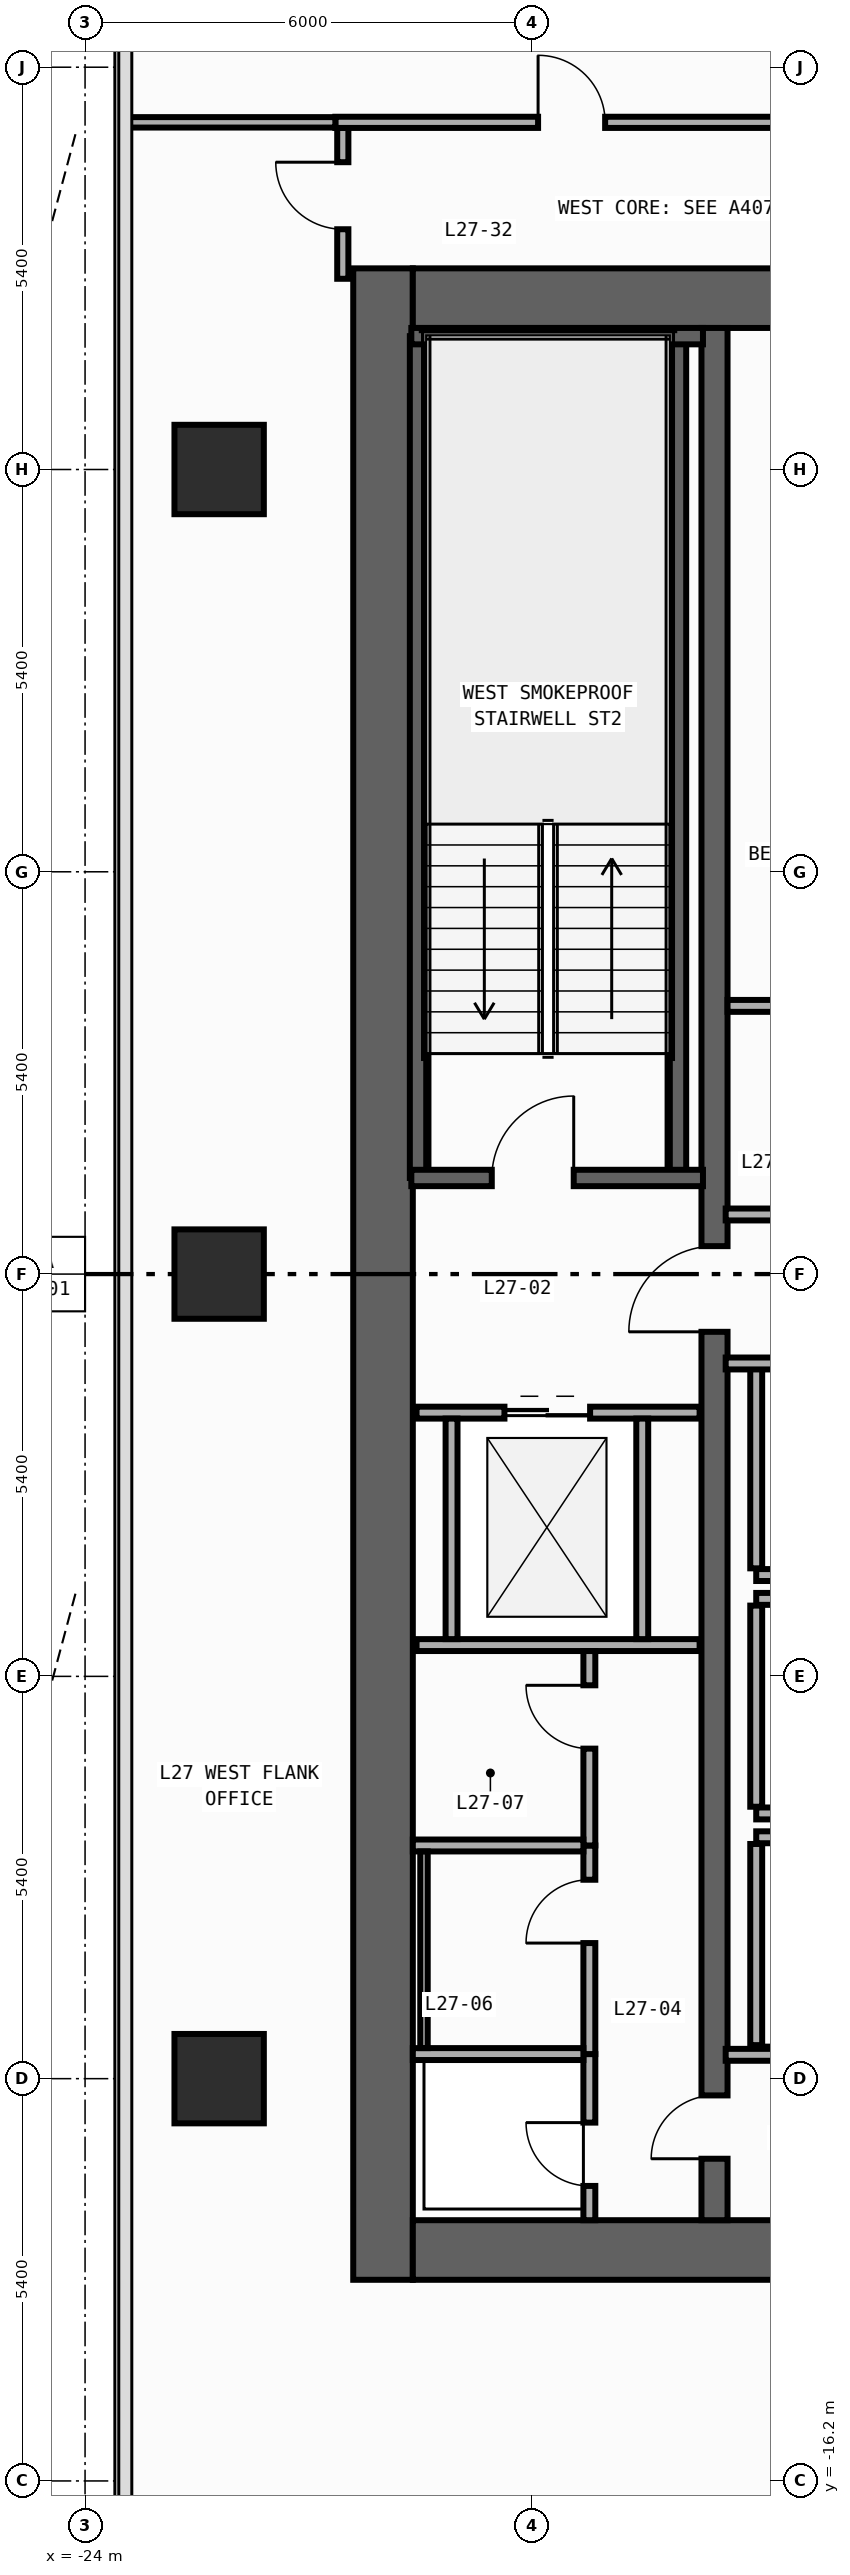
"""IFC4 building model, lengths in metres.
Left out: names, types, materials, properties, quantities, classifications, styles, units other than length and angle.
Written with IfcOpenShell. Run it as: python <this file> out.ifc"""

import sys

from ifc_helpers import new_model, si_unit, direction, frame, frame_2d, origin, origin_2d, place, context, subcontext, project, spatial, rectangle, extrude, element, fill, save


model = new_model("IFC4")
c1 = context("Model", 3, precision=1e-05, world=origin(), true_north=direction((0.0, 1.0)))
c2 = subcontext(c1, "Body", "Model", "MODEL_VIEW")
j1 = project(units=[si_unit("LENGTHUNIT", "METRE"), si_unit("PLANEANGLEUNIT", "RADIAN")], contexts=[c1])
p1 = place(None, origin())
s1 = spatial("IfcSite", under=j1, at=p1, CompositionType="ELEMENT")
p2 = place(p1, origin())
s2 = spatial("IfcBuilding", under=s1, at=p2, CompositionType="ELEMENT")
p3 = place(p2, frame((0.0, 0.0, 118.4)))
s3 = spatial("IfcBuildingStorey", under=s2, at=p3, CompositionType="ELEMENT", Elevation=118.4)
p4 = place(p3, frame((-20.0, -13.5, 0.0), z_axis=(0.0, 0.0, 1.0), x_axis=(0.0, 1.0, 0.0)))
e1 = element("IfcWall", 1, at=p4, inside=s3, PredefinedType="SHEAR", context=c2, shape_type="SweptSolid", body=[
    extrude(rectangle(XDim=27.0, YDim=0.8, at=frame_2d((13.5, 0.0))), origin(), (0.0, 0.0, 1.0), 3.94),
])
for number, where, z_axis, x_axis in (
    (2, (-19.6, -13.1, 0.0), (0.0, 0.0, 1.0), (1.0, 0.0, 0.0)),
    (3, (-19.6, 13.1, 0.0), (0.0, 0.0, 1.0), (1.0, 0.0, 0.0)),
):
    element("IfcWall", number, at=place(p3, frame(where, z_axis=z_axis, x_axis=x_axis)), inside=s3, PredefinedType="SHEAR", context=c2, shape_type="SweptSolid", body=[
        extrude(rectangle(XDim=6.8, YDim=0.8, at=frame_2d((3.4, 0.0))), origin(), (0.0, 0.0, 1.0), 3.94),
    ])
p5 = place(p3, frame((-15.55, -12.7, 0.0), z_axis=(0.0, 0.0, 1.0), x_axis=(0.0, 1.0, 0.0)))
e4 = element("IfcWall", 4, at=p5, inside=s3, PredefinedType="SHEAR", context=c2, shape_type="SweptSolid", body=[
    extrude(rectangle(XDim=25.4, YDim=0.35, at=frame_2d((12.7, 0.0))), origin(), (0.0, 0.0, 1.0), 3.94),
])
p6 = place(p5, frame((11.925, 0.0, 0.0)))
e5 = element("IfcOpeningElement", 5, at=p6, cuts=e4, PredefinedType="OPENING", context=c2, shape_type="SweptSolid", body=[
    extrude(rectangle(XDim=1.15, YDim=2.2, at=frame_2d((0.575, 1.1))), frame((0.0, 0.185, 0.0), z_axis=(0.0, -1.0, 0.0), x_axis=(1.0, 0.0, 0.0)), (0.0, 0.0, 1.0), 0.37),
])
p7 = place(p5, frame((0.825, 0.0, 0.0)))
e6 = element("IfcOpeningElement", 6, at=p7, cuts=e4, PredefinedType="OPENING", context=c2, shape_type="SweptSolid", body=[
    extrude(rectangle(XDim=0.85, YDim=2.1, at=frame_2d((0.425, 1.05))), frame((0.0, 0.185, 0.0), z_axis=(0.0, -1.0, 0.0), x_axis=(1.0, 0.0, 0.0)), (0.0, 0.0, 1.0), 0.37),
])
for number, where, z_axis, x_axis in (
    (7, (-16.04, 1.29, 0.0), (0.0, 0.0, 1.0), (0.0, 1.0, 0.0)),
    (8, (-19.53, 1.29, 0.0), (0.0, 0.0, 1.0), (0.0, 1.0, 0.0)),
):
    element("IfcWall", number, at=place(p3, frame(where, z_axis=z_axis, x_axis=x_axis)), inside=s3, PredefinedType="SHEAR", context=c2, shape_type="SweptSolid", body=[
        extrude(rectangle(XDim=11.3, YDim=0.22, at=frame_2d((5.65, 0.0))), origin(), (0.0, 0.0, 1.0), 3.94),
    ])
p8 = place(p3, frame((-19.62, 12.59, 0.0), z_axis=(0.0, 0.0, 1.0), x_axis=(1.0, 0.0, 0.0)))
e9 = element("IfcWall", 9, at=p8, inside=s3, PredefinedType="SHEAR", context=c2, shape_type="SweptSolid", body=[
    extrude(rectangle(XDim=3.915, YDim=0.22, at=frame_2d((1.958, 0.0))), origin(), (0.0, 0.0, 1.0), 3.94),
])
p9 = place(p3, frame((-19.62, 1.29, 0.0), z_axis=(0.0, 0.0, 1.0), x_axis=(1.0, 0.0, 0.0)))
e10 = element("IfcWall", 10, at=p9, inside=s3, PredefinedType="SHEAR", context=c2, shape_type="SweptSolid", body=[
    extrude(rectangle(XDim=3.915, YDim=0.22, at=frame_2d((1.958, 0.0))), origin(), (0.0, 0.0, 1.0), 3.94),
])
p10 = place(p9, frame((1.08, 0.0, 0.0)))
e11 = element("IfcOpeningElement", 11, at=p10, cuts=e10, PredefinedType="OPENING", context=c2, shape_type="SweptSolid", body=[
    extrude(rectangle(XDim=1.1, YDim=2.2, at=frame_2d((0.55, 1.1))), frame((0.0, 0.12, 0.0), z_axis=(0.0, -1.0, 0.0), x_axis=(1.0, 0.0, 0.0)), (0.0, 0.0, 1.0), 0.24),
])
for number, where, z_axis, x_axis in (
    (12, (-22.2, -10.8, 0.0), (0.0, 0.0, 1.0), (1.0, 0.0, 0.0)),
    (13, (-22.2, 0.0, 0.0), (0.0, 0.0, 1.0), (1.0, 0.0, 0.0)),
    (14, (-22.2, 10.8, 0.0), (0.0, 0.0, 1.0), (1.0, 0.0, 0.0)),
):
    element("IfcColumn", number, at=place(p3, frame(where, z_axis=z_axis, x_axis=x_axis)), inside=s3, PredefinedType="COLUMN", context=c2, shape_type="SweptSolid", body=[
        extrude(rectangle(XDim=1.2, YDim=1.2, at=origin_2d()), origin(), (0.0, 0.0, 1.0), 4.2),
    ])
p11 = place(p3, frame((-14.99, -4.04, 0.0), z_axis=(0.0, 0.0, 1.0), x_axis=(1.0, 0.0, 0.0)))
e15 = element("IfcWall", 15, at=p11, inside=s3, PredefinedType="STANDARD", context=c2, shape_type="SweptSolid", body=[
    extrude(rectangle(XDim=2.19, YDim=0.16, at=frame_2d((1.095, 0.0))), origin(), (0.0, 0.0, 1.0), 3.94),
])
p12 = place(p3, frame((-14.99, -3.95, 0.0), z_axis=(0.0, 0.0, 1.0), x_axis=(0.0, 1.0, 0.0)))
e16 = element("IfcWall", 16, at=p12, inside=s3, PredefinedType="STANDARD", context=c2, shape_type="SweptSolid", body=[
    extrude(rectangle(XDim=2.7, YDim=0.16, at=frame_2d((1.35, 0.0))), origin(), (0.0, 0.0, 1.0), 3.94),
])
for number, where, z_axis, x_axis in (
    (17, (-14.99, -7.24, 0.0), (0.0, 0.0, 1.0), (1.0, 0.0, 0.0)),
    (18, (-14.99, -4.36, 0.0), (0.0, 0.0, 1.0), (1.0, 0.0, 0.0)),
):
    element("IfcWall", number, at=place(p3, frame(where, z_axis=z_axis, x_axis=x_axis)), inside=s3, PredefinedType="STANDARD", context=c2, shape_type="SweptSolid", body=[
        extrude(rectangle(XDim=2.19, YDim=0.16, at=frame_2d((1.095, 0.0))), origin(), (0.0, 0.0, 1.0), 3.94),
    ])
p13 = place(p3, frame((-14.99, -7.15, 0.0), z_axis=(0.0, 0.0, 1.0), x_axis=(0.0, 1.0, 0.0)))
e19 = element("IfcWall", 19, at=p13, inside=s3, PredefinedType="STANDARD", context=c2, shape_type="SweptSolid", body=[
    extrude(rectangle(XDim=2.7, YDim=0.16, at=frame_2d((1.35, 0.0))), origin(), (0.0, 0.0, 1.0), 3.94),
])
p14 = place(p3, frame((-14.99, -7.56, 0.0), z_axis=(0.0, 0.0, 1.0), x_axis=(1.0, 0.0, 0.0)))
e20 = element("IfcWall", 20, at=p14, inside=s3, PredefinedType="STANDARD", context=c2, shape_type="SweptSolid", body=[
    extrude(rectangle(XDim=2.19, YDim=0.16, at=frame_2d((1.095, 0.0))), origin(), (0.0, 0.0, 1.0), 3.94),
])
p15 = place(p3, frame((-14.99, -10.35, 0.0), z_axis=(0.0, 0.0, 1.0), x_axis=(0.0, 1.0, 0.0)))
e21 = element("IfcWall", 21, at=p15, inside=s3, PredefinedType="STANDARD", context=c2, shape_type="SweptSolid", body=[
    extrude(rectangle(XDim=2.7, YDim=0.16, at=frame_2d((1.35, 0.0))), origin(), (0.0, 0.0, 1.0), 3.94),
])
p16 = place(p3, frame((-19.55, -1.86, 0.0), z_axis=(0.0, 0.0, 1.0), x_axis=(1.0, 0.0, 0.0)))
e22 = element("IfcWall", 22, at=p16, inside=s3, PredefinedType="STANDARD", context=c2, shape_type="SweptSolid", body=[
    extrude(rectangle(XDim=3.8, YDim=0.16, at=frame_2d((1.9, 0.0))), origin(), (0.0, 0.0, 1.0), 3.94),
])
p17 = place(p16, frame((1.18, 0.0, 0.0)))
e23 = element("IfcOpeningElement", 23, at=p17, cuts=e22, PredefinedType="OPENING", context=c2, shape_type="SweptSolid", body=[
    extrude(rectangle(XDim=1.15, YDim=2.2, at=frame_2d((0.575, 1.1))), frame((0.0, 0.09, 0.0), z_axis=(0.0, -1.0, 0.0), x_axis=(1.0, 0.0, 0.0)), (0.0, 0.0, 1.0), 0.18),
])
p18 = place(p3, frame((-19.55, -4.98, 0.0), z_axis=(0.0, 0.0, 1.0), x_axis=(1.0, 0.0, 0.0)))
e24 = element("IfcWall", 24, at=p18, inside=s3, PredefinedType="STANDARD", context=c2, shape_type="SweptSolid", body=[
    extrude(rectangle(XDim=3.8, YDim=0.16, at=frame_2d((1.9, 0.0))), origin(), (0.0, 0.0, 1.0), 3.94),
])
for number, where, z_axis, x_axis in (
    (25, (-19.08, -4.9, 0.0), (0.0, 0.0, 1.0), (0.0, 1.0, 0.0)),
    (26, (-16.52, -4.9, 0.0), (0.0, 0.0, 1.0), (0.0, 1.0, 0.0)),
):
    element("IfcWall", number, at=place(p3, frame(where, z_axis=z_axis, x_axis=x_axis)), inside=s3, PredefinedType="STANDARD", context=c2, shape_type="SweptSolid", body=[
        extrude(rectangle(XDim=2.96, YDim=0.16, at=frame_2d((1.48, 0.0))), origin(), (0.0, 0.0, 1.0), 3.94),
    ])
for number, where, z_axis, x_axis in (
    (27, (-15.4, 0.8, 0.0), (0.0, 0.0, 1.0), (1.0, 0.0, 0.0)),
    (28, (-15.4, -1.2, 0.0), (0.0, 0.0, 1.0), (1.0, 0.0, 0.0)),
    (29, (-15.4, -10.48, 0.0), (0.0, 0.0, 1.0), (1.0, 0.0, 0.0)),
):
    element("IfcWall", number, at=place(p3, frame(where, z_axis=z_axis, x_axis=x_axis)), inside=s3, PredefinedType="STANDARD", context=c2, shape_type="SweptSolid", body=[
        extrude(rectangle(XDim=2.6, YDim=0.16, at=frame_2d((1.3, 0.0))), origin(), (0.0, 0.0, 1.0), 3.94),
    ])
p19 = place(p3, frame((-17.23, -12.7, 0.0), z_axis=(0.0, 0.0, 1.0), x_axis=(0.0, 1.0, 0.0)))
e30 = element("IfcWall", 30, at=p19, inside=s3, PredefinedType="PARTITIONING", context=c2, shape_type="SweptSolid", body=[
    extrude(rectangle(XDim=2.23, YDim=0.16, at=frame_2d((1.115, 0.0))), origin(), (0.0, 0.0, 1.0), 3.94),
])
p20 = place(p19, frame((0.46, 0.0, 0.0)))
e31 = element("IfcOpeningElement", 31, at=p20, cuts=e30, PredefinedType="OPENING", context=c2, shape_type="SweptSolid", body=[
    extrude(rectangle(XDim=0.85, YDim=2.1, at=frame_2d((0.425, 1.05))), frame((0.0, 0.09, 0.0), z_axis=(0.0, -1.0, 0.0), x_axis=(1.0, 0.0, 0.0)), (0.0, 0.0, 1.0), 0.18),
])
p21 = place(p3, frame((-17.23, -10.47, 0.0), z_axis=(0.0, 0.0, 1.0), x_axis=(0.0, 1.0, 0.0)))
e32 = element("IfcWall", 32, at=p21, inside=s3, PredefinedType="PARTITIONING", context=c2, shape_type="SweptSolid", body=[
    extrude(rectangle(XDim=2.8, YDim=0.16, at=frame_2d((1.4, 0.0))), origin(), (0.0, 0.0, 1.0), 3.94),
])
p22 = place(p21, frame((1.49, 0.0, 0.0)))
e33 = element("IfcOpeningElement", 33, at=p22, cuts=e32, PredefinedType="OPENING", context=c2, shape_type="SweptSolid", body=[
    extrude(rectangle(XDim=0.85, YDim=2.1, at=frame_2d((0.425, 1.05))), frame((0.0, 0.09, 0.0), z_axis=(0.0, -1.0, 0.0), x_axis=(1.0, 0.0, 0.0)), (0.0, 0.0, 1.0), 0.18),
])
p23 = place(p3, frame((-17.23, -7.67, 0.0), z_axis=(0.0, 0.0, 1.0), x_axis=(0.0, 1.0, 0.0)))
e34 = element("IfcWall", 34, at=p23, inside=s3, PredefinedType="PARTITIONING", context=c2, shape_type="SweptSolid", body=[
    extrude(rectangle(XDim=2.61, YDim=0.16, at=frame_2d((1.305, 0.0))), origin(), (0.0, 0.0, 1.0), 3.94),
])
p24 = place(p23, frame((1.3, 0.0, 0.0)))
e35 = element("IfcOpeningElement", 35, at=p24, cuts=e34, PredefinedType="OPENING", context=c2, shape_type="SweptSolid", body=[
    extrude(rectangle(XDim=0.85, YDim=2.1, at=frame_2d((0.425, 1.05))), frame((0.0, 0.09, 0.0), z_axis=(0.0, -1.0, 0.0), x_axis=(1.0, 0.0, 0.0)), (0.0, 0.0, 1.0), 0.18),
])
for number, where, z_axis, x_axis in (
    (36, (-19.6, -10.47, 0.0), (0.0, 0.0, 1.0), (1.0, 0.0, 0.0)),
    (37, (-19.6, -7.67, 0.0), (0.0, 0.0, 1.0), (1.0, 0.0, 0.0)),
):
    element("IfcWall", number, at=place(p3, frame(where, z_axis=z_axis, x_axis=x_axis)), inside=s3, PredefinedType="PARTITIONING", context=c2, shape_type="SweptSolid", body=[
        extrude(rectangle(XDim=2.29, YDim=0.16, at=frame_2d((1.145, 0.0))), origin(), (0.0, 0.0, 1.0), 3.94),
    ])
p25 = place(p3, frame((-15.375, 3.6, 0.0), z_axis=(0.0, 0.0, 1.0), x_axis=(1.0, 0.0, 0.0)))
e38 = element("IfcWall", 38, at=p25, inside=s3, PredefinedType="PARTITIONING", context=c2, shape_type="SweptSolid", body=[
    extrude(rectangle(XDim=3.065, YDim=0.16, at=frame_2d((1.532, 0.0))), origin(), (0.0, 0.0, 1.0), 3.94),
])
p26 = place(p3, frame((-20.54, 13.36, 0.0), z_axis=(0.0, 0.0, 1.0), x_axis=(0.0, 1.0, 0.0)))
e39 = element("IfcWall", 39, at=p26, inside=s3, PredefinedType="PARTITIONING", context=c2, shape_type="SweptSolid", body=[
    extrude(rectangle(XDim=2.025, YDim=0.15, at=frame_2d((1.012, 0.0))), origin(), (0.0, 0.0, 1.0), 3.94),
])
p27 = place(p26, frame((0.665, 0.0, 0.0)))
e40 = element("IfcOpeningElement", 40, at=p27, cuts=e39, PredefinedType="OPENING", context=c2, shape_type="SweptSolid", body=[
    extrude(rectangle(XDim=0.9, YDim=2.15, at=frame_2d((0.45, 1.075))), frame((0.0, 0.085, 0.0), z_axis=(0.0, -1.0, 0.0), x_axis=(1.0, 0.0, 0.0)), (0.0, 0.0, 1.0), 0.17),
])
p28 = place(p3, frame((-20.64, 15.46, 0.0), z_axis=(0.0, 0.0, 1.0), x_axis=(1.0, 0.0, 0.0)))
e41 = element("IfcWall", 41, at=p28, inside=s3, PredefinedType="PARTITIONING", context=c2, shape_type="SweptSolid", body=[
    extrude(rectangle(XDim=8.194, YDim=0.15, at=frame_2d((4.097, 0.0))), origin(), (0.0, 0.0, 1.0), 3.94),
])
p29 = place(p28, frame((2.722, 0.0, 0.0)))
e42 = element("IfcOpeningElement", 42, at=p29, cuts=e41, PredefinedType="OPENING", context=c2, shape_type="SweptSolid", body=[
    extrude(rectangle(XDim=0.9, YDim=2.15, at=frame_2d((0.45, 1.075))), frame((0.0, 0.085, 0.0), z_axis=(0.0, -1.0, 0.0), x_axis=(1.0, 0.0, 0.0)), (0.0, 0.0, 1.0), 0.17),
])
p30 = place(p3, frame((-23.455, 15.46, 0.0), z_axis=(0.0, 0.0, 1.0), x_axis=(1.0, 0.0, 0.0)))
e43 = element("IfcWall", 43, at=p30, inside=s3, PredefinedType="PARTITIONING", context=c2, shape_type="SweptSolid", body=[
    extrude(rectangle(XDim=2.815, YDim=0.14, at=frame_2d((1.408, 0.0))), origin(), (0.0, 0.0, 1.0), 3.94),
])
p31 = place(p3, frame((-19.45, -10.39, 0.0), z_axis=(0.0, 0.0, 1.0), x_axis=(0.0, 1.0, 0.0)))
e44 = element("IfcWall", 44, at=p31, inside=s3, PredefinedType="PARTITIONING", context=c2, shape_type="SweptSolid", body=[
    extrude(rectangle(XDim=2.64, YDim=0.1, at=frame_2d((1.32, 0.0))), origin(), (0.0, 0.0, 1.0), 3.94),
])
p32 = place(p10, origin())
e45 = element("IfcDoor", 45, at=p32, inside=s3, OperationType="SINGLE_SWING_RIGHT", PredefinedType="DOOR", context=c2, shape_type="SweptSolid", body=[
    extrude(rectangle(XDim=1.1, YDim=2.2, at=frame_2d((0.55, 1.1))), frame((0.0, 0.025, 0.0), z_axis=(0.0, -1.0, 0.0), x_axis=(1.0, 0.0, 0.0)), (0.0, 0.0, 1.0), 0.05),
])
fill(e11, e45)
p33 = place(p6, origin())
e46 = element("IfcDoor", 46, at=p33, inside=s3, OperationType="SINGLE_SWING_LEFT", PredefinedType="DOOR", context=c2, shape_type="SweptSolid", body=[
    extrude(rectangle(XDim=1.15, YDim=2.2, at=frame_2d((0.575, 1.1))), frame((0.0, 0.025, 0.0), z_axis=(0.0, -1.0, 0.0), x_axis=(1.0, 0.0, 0.0)), (0.0, 0.0, 1.0), 0.05),
])
fill(e5, e46)
p34 = place(p7, origin())
e47 = element("IfcDoor", 47, at=p34, inside=s3, OperationType="SINGLE_SWING_LEFT", PredefinedType="DOOR", context=c2, shape_type="SweptSolid", body=[
    extrude(rectangle(XDim=0.85, YDim=2.1, at=frame_2d((0.425, 1.05))), frame((0.0, 0.025, 0.0), z_axis=(0.0, -1.0, 0.0), x_axis=(1.0, 0.0, 0.0)), (0.0, 0.0, 1.0), 0.05),
])
fill(e6, e47)
p35 = place(p17, origin())
e48 = element("IfcDoor", 48, at=p35, inside=s3, OperationType="DOUBLE_DOOR_SLIDING", PredefinedType="DOOR", context=c2, shape_type="SweptSolid", body=[
    extrude(rectangle(XDim=1.15, YDim=2.2, at=frame_2d((0.575, 1.1))), frame((0.0, 0.025, 0.0), z_axis=(0.0, -1.0, 0.0), x_axis=(1.0, 0.0, 0.0)), (0.0, 0.0, 1.0), 0.05),
])
fill(e23, e48)
p36 = place(p20, origin())
e49 = element("IfcDoor", 49, at=p36, inside=s3, OperationType="SINGLE_SWING_RIGHT", PredefinedType="DOOR", context=c2, shape_type="SweptSolid", body=[
    extrude(rectangle(XDim=0.85, YDim=2.1, at=frame_2d((0.425, 1.05))), frame((0.0, 0.025, 0.0), z_axis=(0.0, -1.0, 0.0), x_axis=(1.0, 0.0, 0.0)), (0.0, 0.0, 1.0), 0.05),
])
fill(e31, e49)
p37 = place(p22, origin())
e50 = element("IfcDoor", 50, at=p37, inside=s3, OperationType="SINGLE_SWING_LEFT", PredefinedType="DOOR", context=c2, shape_type="SweptSolid", body=[
    extrude(rectangle(XDim=0.85, YDim=2.1, at=frame_2d((0.425, 1.05))), frame((0.0, 0.025, 0.0), z_axis=(0.0, -1.0, 0.0), x_axis=(1.0, 0.0, 0.0)), (0.0, 0.0, 1.0), 0.05),
])
fill(e33, e50)
p38 = place(p24, origin())
e51 = element("IfcDoor", 51, at=p38, inside=s3, OperationType="SINGLE_SWING_RIGHT", PredefinedType="DOOR", context=c2, shape_type="SweptSolid", body=[
    extrude(rectangle(XDim=0.85, YDim=2.1, at=frame_2d((0.425, 1.05))), frame((0.0, 0.025, 0.0), z_axis=(0.0, -1.0, 0.0), x_axis=(1.0, 0.0, 0.0)), (0.0, 0.0, 1.0), 0.05),
])
fill(e35, e51)
p39 = place(p27, origin())
e52 = element("IfcDoor", 52, at=p39, inside=s3, OperationType="SINGLE_SWING_RIGHT", PredefinedType="DOOR", context=c2, shape_type="SweptSolid", body=[
    extrude(rectangle(XDim=0.9, YDim=2.15, at=frame_2d((0.45, 1.075))), frame((0.0, 0.025, 0.0), z_axis=(0.0, -1.0, 0.0), x_axis=(1.0, 0.0, 0.0)), (0.0, 0.0, 1.0), 0.05),
])
fill(e40, e52)
p40 = place(p29, origin())
e53 = element("IfcDoor", 53, at=p40, inside=s3, OperationType="SINGLE_SWING_LEFT", PredefinedType="DOOR", context=c2, shape_type="SweptSolid", body=[
    extrude(rectangle(XDim=0.9, YDim=2.15, at=frame_2d((0.45, 1.075))), frame((0.0, 0.025, 0.0), z_axis=(0.0, -1.0, 0.0), x_axis=(1.0, 0.0, 0.0)), (0.0, 0.0, 1.0), 0.05),
])
fill(e42, e53)
save(model, sys.argv[1])
